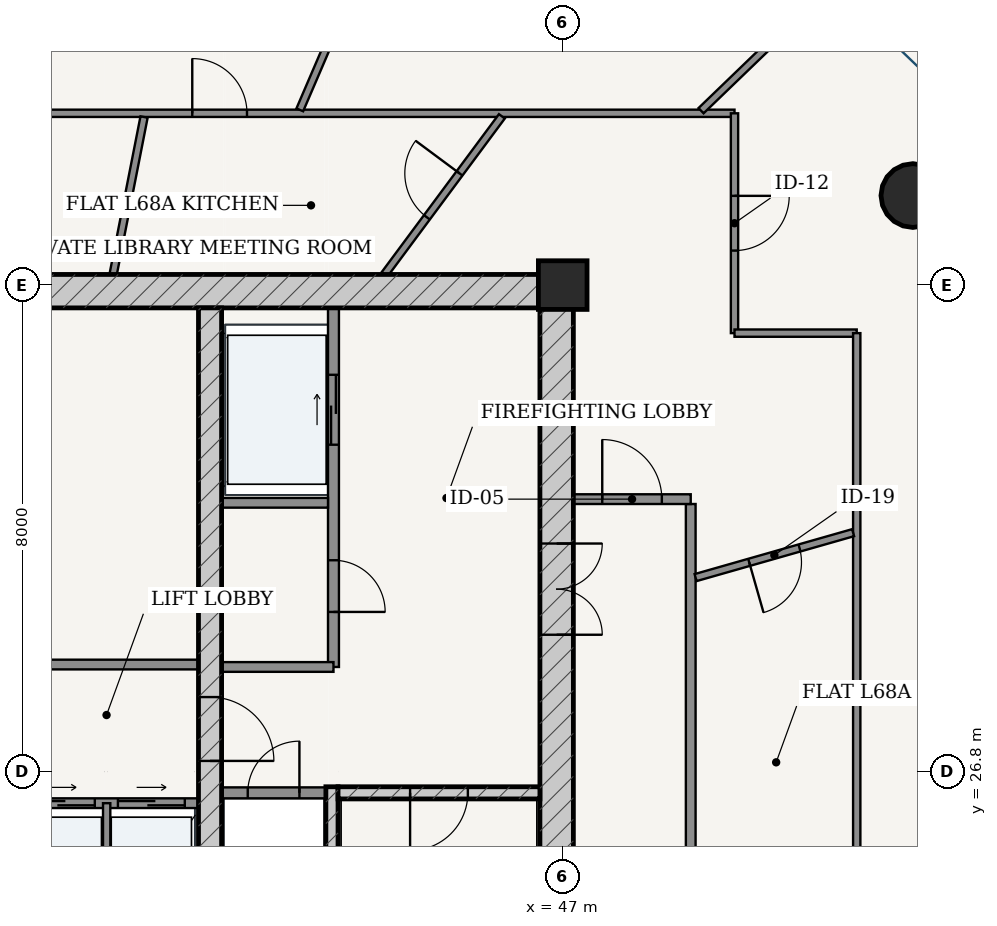
"""IFC4 building model, lengths in metres.
Left out: names, types, materials, properties, quantities, classifications, styles, units other than length and angle.
Written with IfcOpenShell. Run it as: python <this file> out.ifc"""

import sys

from ifc_helpers import new_model, si_unit, direction, frame, frame_2d, origin, origin_2d, place, context, subcontext, project, spatial, rectangle, hollow_circle, extrude, source, transform, mapped, element, fill, save


model = new_model("IFC4")
c1 = context("Model", 3, precision=1e-05, world=origin(), true_north=direction((-0.2419218956, 0.970295726276)))
c2 = subcontext(c1, "Body", "Model", "MODEL_VIEW")
j1 = project(units=[si_unit("LENGTHUNIT", "METRE"), si_unit("PLANEANGLEUNIT", "RADIAN")], contexts=[c1])
p1 = place(None, origin())
s1 = spatial("IfcSite", under=j1, at=p1, CompositionType="ELEMENT")
p2 = place(p1, origin())
s2 = spatial("IfcBuilding", under=s1, at=p2, CompositionType="ELEMENT")
p3 = place(p2, frame((0.0, 0.0, 259.45)))
s3 = spatial("IfcBuildingStorey", under=s2, at=p3, CompositionType="ELEMENT", Elevation=259.45)
p4 = place(p3, frame((47.0, 34.8, 0.0), z_axis=(0.0, 0.0, 1.0), x_axis=(1.0, 0.0, 0.0)))
e1 = element("IfcColumn", 1, at=p4, inside=s3, PredefinedType="COLUMN", context=c2, shape_type="SweptSolid", body=[
    extrude(rectangle(XDim=0.8, YDim=0.8, at=origin_2d()), origin(), (0.0, 0.0, 1.0), 3.75),
])
p5 = place(p3, frame((28.825, 34.7, 0.0), z_axis=(0.0, 0.0, 1.0), x_axis=(1.0, 0.0, 0.0)))
e2 = element("IfcWall", 2, at=p5, inside=s3, PredefinedType="SHEAR", context=c2, shape_type="SweptSolid", body=[
    extrude(rectangle(XDim=18.35, YDim=0.55, at=frame_2d((9.175, 0.0))), origin(), (0.0, 0.0, 1.0), 3.49),
])
p6 = place(p3, frame((46.9, 19.175, 0.0), z_axis=(0.0, 0.0, 1.0), x_axis=(0.0, 1.0, 0.0)))
e3 = element("IfcWall", 3, at=p6, inside=s3, PredefinedType="SHEAR", context=c2, shape_type="SweptSolid", body=[
    extrude(rectangle(XDim=15.25, YDim=0.55, at=frame_2d((7.625, 0.0))), origin(), (0.0, 0.0, 1.0), 3.49),
])
p7 = place(p6, frame((9.875, 0.0, 0.0)))
e4 = element("IfcOpeningElement", 4, at=p7, cuts=e3, PredefinedType="OPENING", context=c2, shape_type="SweptSolid", body=[
    extrude(rectangle(XDim=1.5, YDim=2.2, at=frame_2d((0.75, 1.1))), frame((0.0, 0.285, 0.0), z_axis=(0.0, -1.0, 0.0), x_axis=(1.0, 0.0, 0.0)), (0.0, 0.0, 1.0), 0.57),
])
p8 = place(p3, frame((43.205, 19.175, 0.0), z_axis=(0.0, 0.0, 1.0), x_axis=(0.0, 1.0, 0.0)))
e5 = element("IfcWall", 5, at=p8, inside=s3, PredefinedType="SOLIDWALL", context=c2, shape_type="SweptSolid", body=[
    extrude(rectangle(XDim=7.375, YDim=0.2, at=frame_2d((3.688, 0.0))), origin(), (0.0, 0.0, 1.0), 3.49),
])
p9 = place(p3, frame((43.305, 26.45, 0.0), z_axis=(0.0, 0.0, 1.0), x_axis=(1.0, 0.0, 0.0)))
e6 = element("IfcWall", 6, at=p9, inside=s3, PredefinedType="SOLIDWALL", context=c2, shape_type="SweptSolid", body=[
    extrude(rectangle(XDim=3.32, YDim=0.2, at=frame_2d((1.66, 0.0))), origin(), (0.0, 0.0, 1.0), 3.49),
])
p10 = place(p9, frame((1.185, 0.0, 0.0)))
e7 = element("IfcOpeningElement", 7, at=p10, cuts=e6, PredefinedType="OPENING", context=c2, shape_type="SweptSolid", body=[
    extrude(rectangle(XDim=0.95, YDim=2.15, at=frame_2d((0.475, 1.075))), frame((0.0, 0.11, 0.0), z_axis=(0.0, -1.0, 0.0), x_axis=(1.0, 0.0, 0.0)), (0.0, 0.0, 1.0), 0.22),
])
p11 = place(p3, frame((41.2, 19.175, 0.0), z_axis=(0.0, 0.0, 1.0), x_axis=(0.0, 1.0, 0.0)))
e8 = element("IfcWall", 8, at=p11, inside=s3, PredefinedType="SHEAR", context=c2, shape_type="SweptSolid", body=[
    extrude(rectangle(XDim=15.25, YDim=0.38, at=frame_2d((7.625, 0.0))), origin(), (0.0, 0.0, 1.0), 3.49),
])
p12 = place(p11, frame((7.8, 0.0, 0.0)))
e9 = element("IfcOpeningElement", 9, at=p12, cuts=e8, PredefinedType="OPENING", context=c2, shape_type="SweptSolid", body=[
    extrude(rectangle(XDim=1.05, YDim=2.15, at=frame_2d((0.525, 1.075))), frame((0.0, 0.2, 0.0), z_axis=(0.0, -1.0, 0.0), x_axis=(1.0, 0.0, 0.0)), (0.0, 0.0, 1.0), 0.4),
])
p13 = place(p3, frame((52.759, 36.272, 0.0), z_axis=(0.0, 0.0, 1.0), x_axis=(1.0, 0.0, 0.0)))
e10 = element("IfcColumn", 10, at=p13, inside=s3, PredefinedType="COLUMN", context=c2, shape_type="SweptSolid", body=[
    extrude(hollow_circle(Radius=0.525, WallThickness=0.035, at=origin_2d()), origin(), (0.0, 0.0, 1.0), 3.75),
])
p14 = place(p3, frame((41.39, 26.45, 0.0), z_axis=(0.0, 0.0, 1.0), x_axis=(1.0, 0.0, 0.0)))
e11 = element("IfcWall", 11, at=p14, inside=s3, PredefinedType="PARTITIONING", context=c2, shape_type="SweptSolid", body=[
    extrude(rectangle(XDim=1.71, YDim=0.18, at=frame_2d((0.855, 0.0))), origin(), (0.0, 0.0, 1.0), 3.49),
])
p15 = place(p14, frame((0.43, 0.0, 0.0)))
e12 = element("IfcOpeningElement", 12, at=p15, cuts=e11, PredefinedType="OPENING", context=c2, shape_type="SweptSolid", body=[
    extrude(rectangle(XDim=0.85, YDim=2.1, at=frame_2d((0.425, 1.05))), frame((0.0, 0.1, 0.0), z_axis=(0.0, -1.0, 0.0), x_axis=(1.0, 0.0, 0.0)), (0.0, 0.0, 1.0), 0.2),
])
p16 = place(p3, frame((43.23, 28.52, 0.0), z_axis=(0.0, 0.0, 1.0), x_axis=(0.0, 1.0, 0.0)))
e13 = element("IfcWall", 13, at=p16, inside=s3, PredefinedType="PARTITIONING", context=c2, shape_type="SweptSolid", body=[
    extrude(rectangle(XDim=5.905, YDim=0.18, at=frame_2d((2.953, 0.0))), origin(), (0.0, 0.0, 1.0), 3.49),
])
p17 = place(p16, frame((0.905, 0.0, 0.0)))
e14 = element("IfcOpeningElement", 14, at=p17, cuts=e13, PredefinedType="OPENING", context=c2, shape_type="SweptSolid", body=[
    extrude(rectangle(XDim=0.85, YDim=2.1, at=frame_2d((0.425, 1.05))), frame((0.0, 0.1, 0.0), z_axis=(0.0, -1.0, 0.0), x_axis=(1.0, 0.0, 0.0)), (0.0, 0.0, 1.0), 0.2),
])
p18 = place(p16, frame((3.655, 0.0, 0.0)))
e15 = element("IfcOpeningElement", 15, at=p18, cuts=e13, PredefinedType="OPENING", context=c2, shape_type="SweptSolid", body=[
    extrude(rectangle(XDim=1.15, YDim=2.2, at=frame_2d((0.575, 1.1))), frame((0.0, 0.1, 0.0), z_axis=(0.0, -1.0, 0.0), x_axis=(1.0, 0.0, 0.0)), (0.0, 0.0, 1.0), 0.2),
])
p19 = place(p3, frame((41.39, 31.22, 0.0), z_axis=(0.0, 0.0, 1.0), x_axis=(1.0, 0.0, 0.0)))
e16 = element("IfcWall", 16, at=p19, inside=s3, PredefinedType="PARTITIONING", context=c2, shape_type="SweptSolid", body=[
    extrude(rectangle(XDim=1.75, YDim=0.16, at=frame_2d((0.875, 0.0))), origin(), (0.0, 0.0, 1.0), 3.49),
])
p20 = place(p3, frame((41.39, 28.52, 0.0), z_axis=(0.0, 0.0, 1.0), x_axis=(1.0, 0.0, 0.0)))
e17 = element("IfcWall", 17, at=p20, inside=s3, PredefinedType="PARTITIONING", context=c2, shape_type="SweptSolid", body=[
    extrude(rectangle(XDim=1.84, YDim=0.16, at=frame_2d((0.92, 0.0))), origin(), (0.0, 0.0, 1.0), 3.49),
])
p21 = place(p3, frame((34.99, 28.56, 0.0), z_axis=(0.0, 0.0, 1.0), x_axis=(1.0, 0.0, 0.0)))
e18 = element("IfcWall", 18, at=p21, inside=s3, PredefinedType="PARTITIONING", context=c2, shape_type="SweptSolid", body=[
    extrude(rectangle(XDim=6.02, YDim=0.16, at=frame_2d((3.01, 0.0))), origin(), (0.0, 0.0, 1.0), 3.49),
])
p22 = place(p21, frame((2.585, 0.0, 0.0)))
e19 = element("IfcOpeningElement", 19, at=p22, cuts=e18, PredefinedType="OPENING", context=c2, shape_type="SweptSolid", body=[
    extrude(rectangle(XDim=0.85, YDim=2.1, at=frame_2d((0.425, 1.05))), frame((0.0, 0.09, 0.0), z_axis=(0.0, -1.0, 0.0), x_axis=(1.0, 0.0, 0.0)), (0.0, 0.0, 1.0), 0.18),
])
p23 = place(p3, frame((34.99, 26.28, 0.0), z_axis=(0.0, 0.0, 1.0), x_axis=(1.0, 0.0, 0.0)))
e20 = element("IfcWall", 20, at=p23, inside=s3, PredefinedType="PARTITIONING", context=c2, shape_type="SweptSolid", body=[
    extrude(rectangle(XDim=6.02, YDim=0.16, at=frame_2d((3.01, 0.0))), origin(), (0.0, 0.0, 1.0), 3.49),
])
p24 = place(p23, frame((1.045, 0.0, 0.0)))
e21 = element("IfcOpeningElement", 21, at=p24, cuts=e20, PredefinedType="OPENING", context=c2, shape_type="SweptSolid", body=[
    extrude(rectangle(XDim=0.85, YDim=2.1, at=frame_2d((0.425, 1.05))), frame((0.0, 0.09, 0.0), z_axis=(0.0, -1.0, 0.0), x_axis=(1.0, 0.0, 0.0)), (0.0, 0.0, 1.0), 0.18),
])
p25 = place(p23, frame((3.215, 0.0, 0.0)))
e22 = element("IfcOpeningElement", 22, at=p25, cuts=e20, PredefinedType="OPENING", context=c2, shape_type="SweptSolid", body=[
    extrude(rectangle(XDim=1.1, YDim=2.2, at=frame_2d((0.55, 1.1))), frame((0.0, 0.09, 0.0), z_axis=(0.0, -1.0, 0.0), x_axis=(1.0, 0.0, 0.0)), (0.0, 0.0, 1.0), 0.18),
])
p26 = place(p23, frame((4.695, 0.0, 0.0)))
e23 = element("IfcOpeningElement", 23, at=p26, cuts=e20, PredefinedType="OPENING", context=c2, shape_type="SweptSolid", body=[
    extrude(rectangle(XDim=1.1, YDim=2.2, at=frame_2d((0.55, 1.1))), frame((0.0, 0.09, 0.0), z_axis=(0.0, -1.0, 0.0), x_axis=(1.0, 0.0, 0.0)), (0.0, 0.0, 1.0), 0.18),
])
p27 = place(p3, frame((39.5, 23.72, 0.0), z_axis=(0.0, 0.0, 1.0), x_axis=(0.0, 1.0, 0.0)))
e24 = element("IfcWall", 24, at=p27, inside=s3, PredefinedType="PARTITIONING", context=c2, shape_type="SweptSolid", body=[
    extrude(rectangle(XDim=2.56, YDim=0.12, at=frame_2d((1.28, 0.0))), origin(), (0.0, 0.0, 1.0), 3.49),
])
p28 = place(p3, frame((49.105, 17.275, 0.0), z_axis=(0.0, 0.0, 1.0), x_axis=(0.0, 1.0, 0.0)))
e25 = element("IfcWall", 25, at=p28, inside=s3, PredefinedType="PARTITIONING", context=c2, shape_type="SweptSolid", body=[
    extrude(rectangle(XDim=13.925, YDim=0.16, at=frame_2d((6.962, 0.0))), origin(), (0.0, 0.0, 1.0), 3.015),
])
p29 = place(p28, frame((3.647, 0.0, 0.0)))
e26 = element("IfcOpeningElement", 26, at=p29, cuts=e25, PredefinedType="OPENING", context=c2, shape_type="SweptSolid", body=[
    extrude(rectangle(XDim=0.98, YDim=2.2, at=frame_2d((0.49, 1.1))), frame((0.0, 0.09, 0.0), z_axis=(0.0, -1.0, 0.0), x_axis=(1.0, 0.0, 0.0)), (0.0, 0.0, 1.0), 0.18),
])
p30 = place(p3, frame((47.175, 31.28, 0.0), z_axis=(0.0, 0.0, 1.0), x_axis=(1.0, 0.0, 0.0)))
e27 = element("IfcWall", 27, at=p30, inside=s3, PredefinedType="PARTITIONING", context=c2, shape_type="SweptSolid", body=[
    extrude(rectangle(XDim=1.93, YDim=0.16, at=frame_2d((0.965, 0.0))), origin(), (0.0, 0.0, 1.0), 3.49),
])
p31 = place(p30, frame((0.475, 0.0, 0.0)))
e28 = element("IfcOpeningElement", 28, at=p31, cuts=e27, PredefinedType="OPENING", context=c2, shape_type="SweptSolid", body=[
    extrude(rectangle(XDim=0.98, YDim=2.2, at=frame_2d((0.49, 1.1))), frame((0.0, 0.09, 0.0), z_axis=(0.0, -1.0, 0.0), x_axis=(1.0, 0.0, 0.0)), (0.0, 0.0, 1.0), 0.18),
])
p32 = place(p3, frame((26.175, 37.625, 0.0), z_axis=(0.0, 0.0, 1.0), x_axis=(1.0, 0.0, 0.0)))
e29 = element("IfcWall", 29, at=p32, inside=s3, PredefinedType="PARTITIONING", context=c2, shape_type="SweptSolid", body=[
    extrude(rectangle(XDim=23.65, YDim=0.12, at=frame_2d((11.825, 0.0))), origin(), (0.0, 0.0, 1.0), 3.015),
])
p33 = place(p32, frame((14.733, 0.0, 0.0)))
e30 = element("IfcOpeningElement", 30, at=p33, cuts=e29, PredefinedType="OPENING", context=c2, shape_type="SweptSolid", body=[
    extrude(rectangle(XDim=0.9, YDim=2.15, at=frame_2d((0.45, 1.075))), frame((0.0, 0.07, 0.0), z_axis=(0.0, -1.0, 0.0), x_axis=(1.0, 0.0, 0.0)), (0.0, 0.0, 1.0), 0.14),
])
p34 = place(p32, frame((11.279, 0.0, 0.0)))
e31 = element("IfcOpeningElement", 31, at=p34, cuts=e29, PredefinedType="OPENING", context=c2, shape_type="SweptSolid", body=[
    extrude(rectangle(XDim=0.9, YDim=2.15, at=frame_2d((0.45, 1.075))), frame((0.0, 0.07, 0.0), z_axis=(0.0, -1.0, 0.0), x_axis=(1.0, 0.0, 0.0)), (0.0, 0.0, 1.0), 0.14),
])
p35 = place(p32, frame((2.678, 0.0, 0.0)))
e32 = element("IfcOpeningElement", 32, at=p35, cuts=e29, PredefinedType="OPENING", context=c2, shape_type="SweptSolid", body=[
    extrude(rectangle(XDim=0.9, YDim=2.15, at=frame_2d((0.45, 1.075))), frame((0.0, 0.07, 0.0), z_axis=(0.0, -1.0, 0.0), x_axis=(1.0, 0.0, 0.0)), (0.0, 0.0, 1.0), 0.14),
])
p36 = place(p3, frame((49.825, 37.625, 0.0), z_axis=(0.0, 0.0, 1.0), x_axis=(0.0, -1.0, 0.0)))
e33 = element("IfcWall", 33, at=p36, inside=s3, PredefinedType="PARTITIONING", context=c2, shape_type="SweptSolid", body=[
    extrude(rectangle(XDim=3.615, YDim=0.12, at=frame_2d((1.808, 0.0))), origin(), (0.0, 0.0, 1.0), 3.015),
])
p37 = place(p36, frame((1.357, 0.0, 0.0)))
e34 = element("IfcOpeningElement", 34, at=p37, cuts=e33, PredefinedType="OPENING", context=c2, shape_type="SweptSolid", body=[
    extrude(rectangle(XDim=0.9, YDim=2.15, at=frame_2d((0.45, 1.075))), frame((0.0, 0.07, 0.0), z_axis=(0.0, -1.0, 0.0), x_axis=(1.0, 0.0, 0.0)), (0.0, 0.0, 1.0), 0.14),
])
p38 = place(p3, frame((49.825, 34.01, 0.0), z_axis=(0.0, 0.0, 1.0), x_axis=(1.0, 0.0, 0.0)))
e35 = element("IfcWall", 35, at=p38, inside=s3, PredefinedType="PARTITIONING", context=c2, shape_type="SweptSolid", body=[
    extrude(rectangle(XDim=2.01, YDim=0.12, at=frame_2d((1.005, 0.0))), origin(), (0.0, 0.0, 1.0), 3.209),
])
p39 = place(p3, frame((51.835, 34.01, 0.0), z_axis=(0.0, 0.0, 1.0), x_axis=(0.0, -1.0, 0.0)))
e36 = element("IfcWall", 36, at=p39, inside=s3, PredefinedType="PARTITIONING", context=c2, shape_type="SweptSolid", body=[
    extrude(rectangle(XDim=9.761, YDim=0.12, at=frame_2d((4.88, 0.0))), origin(), (0.0, 0.0, 1.0), 3.015),
])
p40 = place(p3, frame((49.275, 37.668, 0.0), z_axis=(0.0, 0.0, 1.0), x_axis=(0.719954096891, 0.694021684366, 0.0)))
e37 = element("IfcWall", 37, at=p40, inside=s3, PredefinedType="PARTITIONING", context=c2, shape_type="SweptSolid", body=[
    extrude(rectangle(XDim=3.333, YDim=0.12, at=frame_2d((1.667, 0.0))), origin(), (0.0, 0.0, 1.0), 3.121),
])
p41 = place(p3, frame((42.676, 37.682, 0.0), z_axis=(0.0, 0.0, 1.0), x_axis=(0.394777489933, 0.918776759307, 0.0)))
e38 = element("IfcWall", 38, at=p41, inside=s3, PredefinedType="PARTITIONING", context=c2, shape_type="SweptSolid", body=[
    extrude(rectangle(XDim=6.9, YDim=0.12, at=frame_2d((3.45, 0.0))), origin(), (0.0, 0.0, 1.0), 3.121),
])
p42 = place(p41, frame((3.0, 0.0, 0.0)))
e39 = element("IfcOpeningElement", 39, at=p42, cuts=e38, PredefinedType="OPENING", context=c2, shape_type="SweptSolid", body=[
    extrude(rectangle(XDim=0.9, YDim=2.15, at=frame_2d((0.45, 1.075))), frame((0.0, 0.07, 0.0), z_axis=(0.0, -1.0, 0.0), x_axis=(1.0, 0.0, 0.0)), (0.0, 0.0, 1.0), 0.14),
])
p43 = place(p3, frame((49.185, 29.99, 0.0), z_axis=(0.0, 0.0, 1.0), x_axis=(0.961653809431, 0.274266204273, 0.0)))
e40 = element("IfcWall", 40, at=p43, inside=s3, PredefinedType="PARTITIONING", context=c2, shape_type="SweptSolid", body=[
    extrude(rectangle(XDim=2.694, YDim=0.12, at=frame_2d((1.347, 0.0))), origin(), (0.0, 0.0, 1.0), 3.209),
])
p44 = place(p43, frame((0.917, 0.0, 0.0)))
e41 = element("IfcOpeningElement", 41, at=p44, cuts=e40, PredefinedType="OPENING", context=c2, shape_type="SweptSolid", body=[
    extrude(rectangle(XDim=0.86, YDim=2.15, at=frame_2d((0.43, 1.075))), frame((0.0, 0.07, 0.0), z_axis=(0.0, -1.0, 0.0), x_axis=(1.0, 0.0, 0.0)), (0.0, 0.0, 1.0), 0.14),
])
p45 = place(p3, frame((44.07, 34.977, 0.0), z_axis=(0.0, 0.0, 1.0), x_axis=(0.596033679783, 0.802959433947, 0.0)))
e42 = element("IfcWall", 42, at=p45, inside=s3, PredefinedType="PARTITIONING", context=c2, shape_type="SweptSolid", body=[
    extrude(rectangle(XDim=3.236, YDim=0.12, at=frame_2d((1.618, 0.0))), origin(), (0.0, 0.0, 1.0), 3.49),
])
p46 = place(p45, frame((1.168, 0.0, 0.0)))
e43 = element("IfcOpeningElement", 43, at=p46, cuts=e42, PredefinedType="OPENING", context=c2, shape_type="SweptSolid", body=[
    extrude(rectangle(XDim=0.9, YDim=2.15, at=frame_2d((0.45, 1.075))), frame((0.0, 0.07, 0.0), z_axis=(0.0, -1.0, 0.0), x_axis=(1.0, 0.0, 0.0)), (0.0, 0.0, 1.0), 0.14),
])
p47 = place(p3, frame((39.607, 34.977, 0.0), z_axis=(0.0, 0.0, 1.0), x_axis=(0.192785105701, 0.981241001497, 0.0)))
e44 = element("IfcWall", 44, at=p47, inside=s3, PredefinedType="PARTITIONING", context=c2, shape_type="SweptSolid", body=[
    extrude(rectangle(XDim=2.637, YDim=0.12, at=frame_2d((1.318, 0.0))), origin(), (0.0, 0.0, 1.0), 2.575),
])
m1 = source(origin(), c2, "Body", "SweptSolid", [
    extrude(rectangle(XDim=1.5, YDim=2.2, at=frame_2d((0.75, 1.1))), frame((0.0, 0.025, 0.0), z_axis=(0.0, -1.0, 0.0), x_axis=(1.0, 0.0, 0.0)), (0.0, 0.0, 1.0), 0.05),
])
p48 = place(p7, frame((1.5, 0.0, 0.0), z_axis=(0.0, 0.0, 1.0), x_axis=(-1.0, 0.0, 0.0)))
e45 = element("IfcDoor", 45, at=p48, inside=s3, OperationType="DOUBLE_DOOR_SINGLE_SWING", PredefinedType="DOOR", context=c2, shape_type="MappedRepresentation", body=[
    mapped(m1, transform((0.0, 0.0, 0.0), scale=1.0)),
])
fill(e4, e45)
m2 = source(origin(), c2, "Body", "SweptSolid", [
    extrude(rectangle(XDim=1.05, YDim=2.15, at=frame_2d((0.525, 1.075))), frame((0.0, 0.025, 0.0), z_axis=(0.0, -1.0, 0.0), x_axis=(1.0, 0.0, 0.0)), (0.0, 0.0, 1.0), 0.05),
])
p49 = place(p12, frame((1.05, 0.0, 0.0), z_axis=(0.0, 0.0, 1.0), x_axis=(-1.0, 0.0, 0.0)))
e46 = element("IfcDoor", 46, at=p49, inside=s3, OperationType="SINGLE_SWING_RIGHT", PredefinedType="DOOR", context=c2, shape_type="MappedRepresentation", body=[
    mapped(m2, transform((0.0, 0.0, 0.0), scale=1.0)),
])
fill(e9, e46)
m3 = source(origin(), c2, "Body", "SweptSolid", [
    extrude(rectangle(XDim=0.95, YDim=2.15, at=frame_2d((0.475, 1.075))), frame((0.0, 0.025, 0.0), z_axis=(0.0, -1.0, 0.0), x_axis=(1.0, 0.0, 0.0)), (0.0, 0.0, 1.0), 0.05),
])
p50 = place(p10, frame((0.95, 0.0, 0.0), z_axis=(0.0, 0.0, 1.0), x_axis=(-1.0, 0.0, 0.0)))
e47 = element("IfcDoor", 47, at=p50, inside=s3, OperationType="SINGLE_SWING_RIGHT", PredefinedType="DOOR", context=c2, shape_type="MappedRepresentation", body=[
    mapped(m3, transform((0.0, 0.0, 0.0), scale=1.0)),
])
fill(e7, e47)
m4 = source(origin(), c2, "Body", "SweptSolid", [
    extrude(rectangle(XDim=0.85, YDim=2.1, at=frame_2d((0.425, 1.05))), frame((0.0, 0.025, 0.0), z_axis=(0.0, -1.0, 0.0), x_axis=(1.0, 0.0, 0.0)), (0.0, 0.0, 1.0), 0.05),
])
p51 = place(p15, origin())
e48 = element("IfcDoor", 48, at=p51, inside=s3, OperationType="SINGLE_SWING_RIGHT", PredefinedType="DOOR", context=c2, shape_type="MappedRepresentation", body=[
    mapped(m4, transform((0.0, 0.0, 0.0), scale=1.0)),
])
fill(e12, e48)
p52 = place(p17, frame((0.85, 0.0, 0.0), z_axis=(0.0, 0.0, 1.0), x_axis=(-1.0, 0.0, 0.0)))
e49 = element("IfcDoor", 49, at=p52, inside=s3, OperationType="SINGLE_SWING_RIGHT", PredefinedType="DOOR", context=c2, shape_type="MappedRepresentation", body=[
    mapped(m4, transform((0.0, 0.0, 0.0), scale=1.0)),
])
fill(e14, e49)
m5 = source(origin(), c2, "Body", "SweptSolid", [
    extrude(rectangle(XDim=1.15, YDim=2.2, at=frame_2d((0.575, 1.1))), frame((0.0, 0.025, 0.0), z_axis=(0.0, -1.0, 0.0), x_axis=(1.0, 0.0, 0.0)), (0.0, 0.0, 1.0), 0.05),
])
p53 = place(p18, origin())
e50 = element("IfcDoor", 50, at=p53, inside=s3, OperationType="DOUBLE_DOOR_SLIDING", PredefinedType="DOOR", context=c2, shape_type="MappedRepresentation", body=[
    mapped(m5, transform((0.0, 0.0, 0.0), scale=1.0)),
])
fill(e15, e50)
m6 = source(origin(), c2, "Body", "SweptSolid", [
    extrude(rectangle(XDim=1.1, YDim=2.2, at=frame_2d((0.55, 1.1))), frame((0.0, 0.025, 0.0), z_axis=(0.0, -1.0, 0.0), x_axis=(1.0, 0.0, 0.0)), (0.0, 0.0, 1.0), 0.05),
])
p54 = place(p25, origin())
e51 = element("IfcDoor", 51, at=p54, inside=s3, OperationType="DOUBLE_DOOR_SLIDING", PredefinedType="DOOR", context=c2, shape_type="MappedRepresentation", body=[
    mapped(m6, transform((0.0, 0.0, 0.0), scale=1.0)),
])
fill(e22, e51)
p55 = place(p26, origin())
e52 = element("IfcDoor", 52, at=p55, inside=s3, OperationType="DOUBLE_DOOR_SLIDING", PredefinedType="DOOR", context=c2, shape_type="MappedRepresentation", body=[
    mapped(m6, transform((0.0, 0.0, 0.0), scale=1.0)),
])
fill(e23, e52)
m7 = source(origin(), c2, "Body", "SweptSolid", [
    extrude(rectangle(XDim=0.98, YDim=2.2, at=frame_2d((0.49, 1.1))), frame((0.0, 0.025, 0.0), z_axis=(0.0, -1.0, 0.0), x_axis=(1.0, 0.0, 0.0)), (0.0, 0.0, 1.0), 0.05),
])
p56 = place(p31, origin())
e53 = element("IfcDoor", 53, at=p56, inside=s3, OperationType="SINGLE_SWING_LEFT", PredefinedType="DOOR", context=c2, shape_type="MappedRepresentation", body=[
    mapped(m7, transform((0.0, 0.0, 0.0), scale=1.0)),
])
fill(e28, e53)
m8 = source(origin(), c2, "Body", "SweptSolid", [
    extrude(rectangle(XDim=0.86, YDim=2.15, at=frame_2d((0.43, 1.075))), frame((0.0, 0.025, 0.0), z_axis=(0.0, -1.0, 0.0), x_axis=(1.0, 0.0, 0.0)), (0.0, 0.0, 1.0), 0.05),
])
p57 = place(p44, frame((0.86, 0.0, 0.0), z_axis=(0.0, 0.0, 1.0), x_axis=(-1.0, 0.0, 0.0)))
e54 = element("IfcDoor", 54, at=p57, inside=s3, OperationType="SINGLE_SWING_RIGHT", PredefinedType="DOOR", context=c2, shape_type="MappedRepresentation", body=[
    mapped(m8, transform((0.0, 0.0, 0.0), scale=1.0)),
])
fill(e41, e54)
m9 = source(origin(), c2, "Body", "SweptSolid", [
    extrude(rectangle(XDim=0.9, YDim=2.15, at=frame_2d((0.45, 1.075))), frame((0.0, 0.025, 0.0), z_axis=(0.0, -1.0, 0.0), x_axis=(1.0, 0.0, 0.0)), (0.0, 0.0, 1.0), 0.05),
])
p58 = place(p37, origin())
e55 = element("IfcDoor", 55, at=p58, inside=s3, OperationType="SINGLE_SWING_LEFT", PredefinedType="DOOR", context=c2, shape_type="MappedRepresentation", body=[
    mapped(m9, transform((0.0, 0.0, 0.0), scale=1.0)),
])
fill(e34, e55)
p59 = place(p46, origin())
e56 = element("IfcDoor", 56, at=p59, inside=s3, OperationType="SINGLE_SWING_RIGHT", PredefinedType="DOOR", context=c2, shape_type="MappedRepresentation", body=[
    mapped(m9, transform((0.0, 0.0, 0.0), scale=1.0)),
])
fill(e43, e56)
p60 = place(p33, origin())
e57 = element("IfcDoor", 57, at=p60, inside=s3, OperationType="SINGLE_SWING_LEFT", PredefinedType="DOOR", context=c2, shape_type="MappedRepresentation", body=[
    mapped(m9, transform((0.0, 0.0, 0.0), scale=1.0)),
])
fill(e30, e57)
save(model, sys.argv[1])
